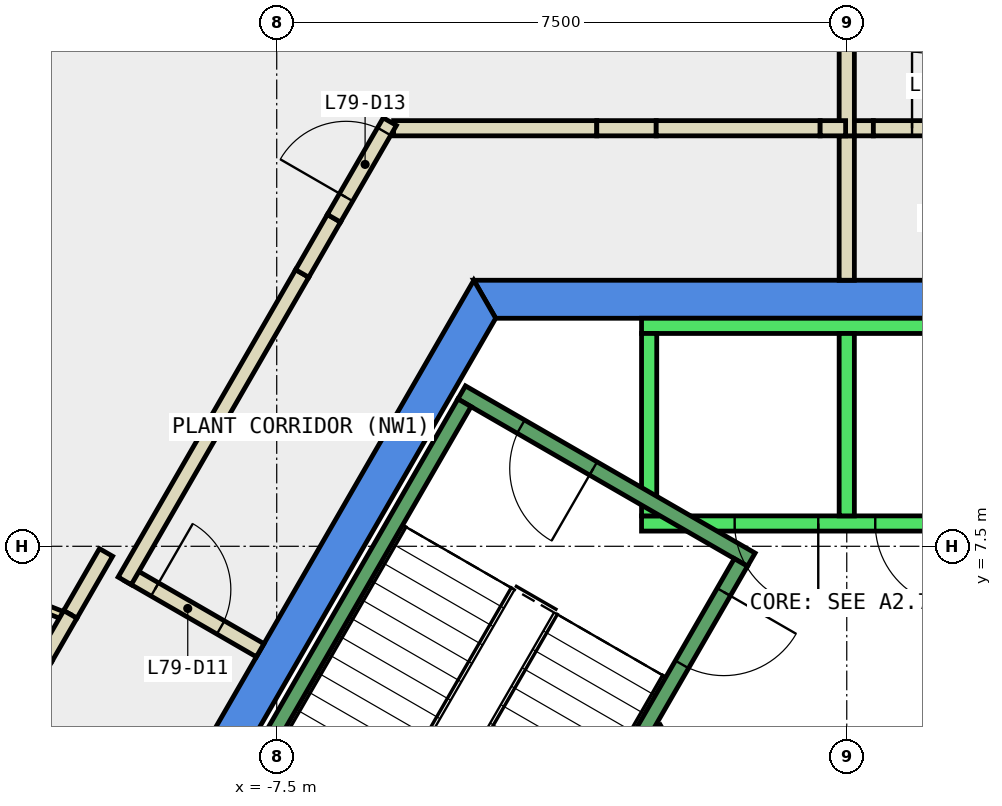
"""IFC4 building model, lengths in metres.
Left out: names, types, materials, properties, quantities, classifications, styles, units other than length and angle.
Written with IfcOpenShell. Run it as: python <this file> out.ifc"""

import sys

from ifc_helpers import new_model, si_unit, direction, frame, frame_2d, origin, place, context, subcontext, project, spatial, polyline, rectangle, outline, extrude, element, fill, save


model = new_model("IFC4")
c1 = context("Model", 3, precision=1e-05, world=origin(), true_north=direction((0.0, 1.0)))
c2 = subcontext(c1, "Body", "Model", "MODEL_VIEW")
j1 = project(units=[si_unit("LENGTHUNIT", "METRE"), si_unit("PLANEANGLEUNIT", "RADIAN")], contexts=[c1])
p1 = place(None, origin())
s1 = spatial("IfcSite", under=j1, at=p1, CompositionType="ELEMENT")
p2 = place(p1, origin())
s2 = spatial("IfcBuilding", under=s1, at=p2, CompositionType="ELEMENT")
p3 = place(p2, frame((0.0, 0.0, 335.9)))
s3 = spatial("IfcBuildingStorey", under=s2, at=p3, CompositionType="ELEMENT", Elevation=335.9)
p4 = place(p3, frame((0.0, 0.0, -0.35)))
e1 = element("IfcWall", 1, at=p4, inside=s3, PredefinedType="SHEAR", context=c2, shape_type="SweptSolid", body=[
    extrude(outline(polyline([(4.907, 11.0), (-4.907, 11.0), (-4.619, 10.5), (4.619, 10.5), (4.907, 11.0)])), origin(), (0.0, 0.0, 1.0), 4.4),
])
p5 = place(p3, frame((0.0, 0.0, -0.35)))
e2 = element("IfcWall", 2, at=p5, inside=s3, PredefinedType="SHEAR", context=c2, shape_type="SweptSolid", body=[
    extrude(outline(polyline([(-9.236, 3.502), (-8.803, 3.253), (-4.619, 10.5), (-4.907, 11.0), (-9.236, 3.502)])), origin(), (0.0, 0.0, 1.0), 4.4),
])
p6 = place(p3, frame((-10.287, 14.711, 0.0), z_axis=(0.0, 0.0, 1.0), x_axis=(-0.509697735304, -0.86035354281, 0.0)))
e3 = element("IfcWall", 3, at=p6, inside=s3, PredefinedType="STANDARD", context=c2, shape_type="SweptSolid", body=[
    extrude(rectangle(XDim=7.098, YDim=0.3, at=frame_2d((3.549, 0.0))), origin(), (0.0, 0.0, 1.0), 4.05),
])
p7 = place(p6, frame((0.575, 0.0, 0.9)))
e4 = element("IfcOpeningElement", 4, at=p7, cuts=e3, PredefinedType="OPENING", context=c2, shape_type="SweptSolid", body=[
    extrude(rectangle(XDim=2.4, YDim=3.0, at=frame_2d((1.2, 1.5))), frame((0.0, 0.16, 0.0), z_axis=(0.0, -1.0, 0.0), x_axis=(1.0, 0.0, 0.0)), (0.0, 0.0, 1.0), 0.32),
])
p8 = place(p6, frame((4.124, 0.0, 0.9)))
e5 = element("IfcOpeningElement", 5, at=p8, cuts=e3, PredefinedType="OPENING", context=c2, shape_type="SweptSolid", body=[
    extrude(rectangle(XDim=2.4, YDim=3.0, at=frame_2d((1.2, 1.5))), frame((0.0, 0.16, 0.0), z_axis=(0.0, -1.0, 0.0), x_axis=(1.0, 0.0, 0.0)), (0.0, 0.0, 1.0), 0.32),
])
p9 = place(p3, frame((-2.54, 5.1, 0.0), z_axis=(0.0, 0.0, 1.0), x_axis=(0.499925051871, -0.866068670783, 0.0)))
e6 = element("IfcWall", 6, at=p9, inside=s3, PredefinedType="PARTITIONING", context=c2, shape_type="SweptSolid", body=[
    extrude(rectangle(XDim=5.181, YDim=0.2, at=frame_2d((2.59, 0.0))), origin(), (0.0, 0.0, 1.0), 4.05),
])
p10 = place(p9, frame((2.04, 0.0, 0.0)))
e7 = element("IfcOpeningElement", 7, at=p10, cuts=e6, PredefinedType="OPENING", context=c2, shape_type="SweptSolid", body=[
    extrude(rectangle(XDim=1.0, YDim=2.1, at=frame_2d((0.5, 1.05))), frame((0.0, 0.11, 0.0), z_axis=(0.0, -1.0, 0.0), x_axis=(1.0, 0.0, 0.0)), (0.0, 0.0, 1.0), 0.22),
])
p11 = place(p3, frame((0.015, 13.0, 0.0), z_axis=(0.0, 0.0, 1.0), x_axis=(1.0, 0.0, 0.0)))
e8 = element("IfcWall", 8, at=p11, inside=s3, PredefinedType="PARTITIONING", context=c2, shape_type="SweptSolid", body=[
    extrude(rectangle(XDim=0.335, YDim=0.2, at=frame_2d((0.167, 0.0))), origin(), (0.0, 0.0, 1.0), 1.95),
])
p12 = place(p3, frame((0.0, 11.0, 0.0), z_axis=(0.0, 0.0, 1.0), x_axis=(0.0, 1.0, 0.0)))
e9 = element("IfcWall", 9, at=p12, inside=s3, PredefinedType="PARTITIONING", context=c2, shape_type="SweptSolid", body=[
    extrude(rectangle(XDim=1.9, YDim=0.2, at=frame_2d((0.95, 0.0))), origin(), (0.0, 0.0, 1.0), 1.95),
])
p13 = place(p3, frame((0.0, 12.9, 0.0), z_axis=(0.0, 0.0, 1.0), x_axis=(0.0, 1.0, 0.0)))
e10 = element("IfcWall", 10, at=p13, inside=s3, PredefinedType="PARTITIONING", context=c2, shape_type="SweptSolid", body=[
    extrude(rectangle(XDim=10.092, YDim=0.2, at=frame_2d((5.046, 0.0))), origin(), (0.0, 0.0, 1.0), 1.95),
])
p14 = place(p3, frame((-9.45, 7.132, 0.0), z_axis=(0.0, 0.0, 1.0), x_axis=(0.866010750942, -0.50002537861, 0.0)))
e11 = element("IfcWall", 11, at=p14, inside=s3, PredefinedType="PARTITIONING", context=c2, shape_type="SweptSolid", body=[
    extrude(rectangle(XDim=2.0, YDim=0.2, at=frame_2d((1.0, 0.0))), origin(), (0.0, 0.0, 1.0), 4.05),
])
p15 = place(p14, frame((0.4, 0.0, 0.0)))
e12 = element("IfcOpeningElement", 12, at=p15, cuts=e11, PredefinedType="OPENING", context=c2, shape_type="SweptSolid", body=[
    extrude(rectangle(XDim=1.0, YDim=2.1, at=frame_2d((0.5, 1.05))), frame((0.0, 0.11, 0.0), z_axis=(0.0, -1.0, 0.0), x_axis=(1.0, 0.0, 0.0)), (0.0, 0.0, 1.0), 0.22),
])
p16 = place(p3, frame((-10.216, 6.604, 0.0), z_axis=(0.0, 0.0, 1.0), x_axis=(0.499572668549, 0.866271983178, 0.0)))
e13 = element("IfcWall", 13, at=p16, inside=s3, PredefinedType="PARTITIONING", context=c2, shape_type="SweptSolid", body=[
    extrude(rectangle(XDim=0.941, YDim=0.2, at=frame_2d((0.47, 0.0))), origin(), (0.0, 0.0, 1.0), 1.95),
])
p17 = place(p3, frame((-9.5, 7.045, 0.0), z_axis=(0.0, 0.0, 1.0), x_axis=(0.500007559336, 0.866021039356, 0.0)))
e14 = element("IfcWall", 14, at=p17, inside=s3, PredefinedType="PARTITIONING", context=c2, shape_type="SweptSolid", body=[
    extrude(rectangle(XDim=4.67, YDim=0.2, at=frame_2d((2.335, 0.0))), origin(), (0.0, 0.0, 1.0), 4.05),
])
p18 = place(p3, frame((-5.962, 13.0, 0.0), z_axis=(0.0, 0.0, 1.0), x_axis=(1.0, 0.0, 0.0)))
e15 = element("IfcWall", 15, at=p18, inside=s3, PredefinedType="PARTITIONING", context=c2, shape_type="SweptSolid", body=[
    extrude(rectangle(XDim=2.673, YDim=0.2, at=frame_2d((1.336, 0.0))), origin(), (0.0, 0.0, 1.0), 4.05),
])
p19 = place(p3, frame((-13.135, 7.709, 0.0), z_axis=(0.0, 0.0, 1.0), x_axis=(0.929543616209, -0.368712171707, 0.0)))
e16 = element("IfcWall", 16, at=p19, inside=s3, PredefinedType="PARTITIONING", context=c2, shape_type="SweptSolid", body=[
    extrude(rectangle(XDim=3.113, YDim=0.1, at=frame_2d((1.557, 0.0))), origin(), (0.0, 0.0, 1.0), 1.95),
])
p20 = place(p3, frame((0.35, 13.0, 0.0), z_axis=(0.0, 0.0, 1.0), x_axis=(1.0, 0.0, 0.0)))
e17 = element("IfcWall", 17, at=p20, inside=s3, PredefinedType="PARTITIONING", context=c2, shape_type="SweptSolid", body=[
    extrude(rectangle(XDim=2.157, YDim=0.2, at=frame_2d((1.079, 0.0))), origin(), (0.0, 0.0, 1.0), 4.05),
])
p21 = place(p20, frame((0.509, 0.0, 0.0)))
e18 = element("IfcOpeningElement", 18, at=p21, cuts=e17, PredefinedType="OPENING", context=c2, shape_type="SweptSolid", body=[
    extrude(rectangle(XDim=1.0, YDim=2.1, at=frame_2d((0.5, 1.05))), frame((0.0, 0.11, 0.0), z_axis=(0.0, -1.0, 0.0), x_axis=(1.0, 0.0, 0.0)), (0.0, 0.0, 1.0), 0.22),
])
p22 = place(p3, frame((-10.543, 6.037, 0.0), z_axis=(0.0, 0.0, 1.0), x_axis=(0.49955019049, 0.86628494572, 0.0)))
e19 = element("IfcWall", 19, at=p22, inside=s3, PredefinedType="PARTITIONING", context=c2, shape_type="SweptSolid", body=[
    extrude(rectangle(XDim=0.654, YDim=0.2, at=frame_2d((0.327, 0.0))), origin(), (0.0, 0.0, 1.0), 1.95),
])
p23 = place(p3, frame((-7.165, 11.089, 0.0), z_axis=(0.0, 0.0, 1.0), x_axis=(0.499024148071, 0.866588079564, 0.0)))
e20 = element("IfcWall", 20, at=p23, inside=s3, PredefinedType="PARTITIONING", context=c2, shape_type="SweptSolid", body=[
    extrude(rectangle(XDim=0.838, YDim=0.2, at=frame_2d((0.419, 0.0))), origin(), (0.0, 0.0, 1.0), 1.95),
])
p24 = place(p3, frame((-6.747, 11.815, 0.0), z_axis=(0.0, 0.0, 1.0), x_axis=(0.500374498448, 0.865809079014, 0.0)))
e21 = element("IfcWall", 21, at=p24, inside=s3, PredefinedType="PARTITIONING", context=c2, shape_type="SweptSolid", body=[
    extrude(rectangle(XDim=1.469, YDim=0.2, at=frame_2d((0.734, 0.0))), origin(), (0.0, 0.0, 1.0), 4.05),
])
p25 = place(p24, frame((0.319, 0.0, 0.0)))
e22 = element("IfcOpeningElement", 22, at=p25, cuts=e21, PredefinedType="OPENING", context=c2, shape_type="SweptSolid", body=[
    extrude(rectangle(XDim=1.0, YDim=2.1, at=frame_2d((0.5, 1.05))), frame((0.0, 0.11, 0.0), z_axis=(0.0, -1.0, 0.0), x_axis=(1.0, 0.0, 0.0)), (0.0, 0.0, 1.0), 0.22),
])
p26 = place(p3, frame((-3.289, 13.0, 0.0), z_axis=(0.0, 0.0, 1.0), x_axis=(1.0, 0.0, 0.0)))
e23 = element("IfcWall", 23, at=p26, inside=s3, PredefinedType="PARTITIONING", context=c2, shape_type="SweptSolid", body=[
    extrude(rectangle(XDim=0.782, YDim=0.2, at=frame_2d((0.391, 0.0))), origin(), (0.0, 0.0, 1.0), 1.95),
])
p27 = place(p3, frame((-2.507, 13.0, 0.0), z_axis=(0.0, 0.0, 1.0), x_axis=(1.0, 0.0, 0.0)))
e24 = element("IfcWall", 24, at=p27, inside=s3, PredefinedType="PARTITIONING", context=c2, shape_type="SweptSolid", body=[
    extrude(rectangle(XDim=2.157, YDim=0.2, at=frame_2d((1.079, 0.0))), origin(), (0.0, 0.0, 1.0), 4.05),
])
p28 = place(p3, frame((-0.35, 13.0, 0.0), z_axis=(0.0, 0.0, 1.0), x_axis=(1.0, 0.0, 0.0)))
e25 = element("IfcWall", 25, at=p28, inside=s3, PredefinedType="PARTITIONING", context=c2, shape_type="SweptSolid", body=[
    extrude(rectangle(XDim=0.335, YDim=0.2, at=frame_2d((0.167, 0.0))), origin(), (0.0, 0.0, 1.0), 1.95),
])
p29 = place(p3, frame((2.7, 7.8, 0.0), z_axis=(0.0, 0.0, 1.0), x_axis=(-1.0, 0.0, 0.0)))
e26 = element("IfcWall", 26, at=p29, inside=s3, PredefinedType="STANDARD", context=c2, shape_type="SweptSolid", body=[
    extrude(rectangle(XDim=5.4, YDim=0.2, at=frame_2d((2.7, 0.0))), origin(), (0.0, 0.0, 1.0), 4.05),
])
p30 = place(p29, frame((1.225, 0.0, 0.0)))
e27 = element("IfcOpeningElement", 27, at=p30, cuts=e26, PredefinedType="OPENING", context=c2, shape_type="SweptSolid", body=[
    extrude(rectangle(XDim=1.1, YDim=2.1, at=frame_2d((0.55, 1.05))), frame((0.0, 0.11, 0.0), z_axis=(0.0, -1.0, 0.0), x_axis=(1.0, 0.0, 0.0)), (0.0, 0.0, 1.0), 0.22),
])
p31 = place(p29, frame((3.075, 0.0, 0.0)))
e28 = element("IfcOpeningElement", 28, at=p31, cuts=e26, PredefinedType="OPENING", context=c2, shape_type="SweptSolid", body=[
    extrude(rectangle(XDim=1.1, YDim=2.1, at=frame_2d((0.55, 1.05))), frame((0.0, 0.11, 0.0), z_axis=(0.0, -1.0, 0.0), x_axis=(1.0, 0.0, 0.0)), (0.0, 0.0, 1.0), 0.22),
])
p32 = place(p3, frame((2.7, 10.4, 0.0), z_axis=(0.0, 0.0, 1.0), x_axis=(-1.0, 0.0, 0.0)))
e29 = element("IfcWall", 29, at=p32, inside=s3, PredefinedType="STANDARD", context=c2, shape_type="SweptSolid", body=[
    extrude(rectangle(XDim=5.4, YDim=0.2, at=frame_2d((2.7, 0.0))), origin(), (0.0, 0.0, 1.0), 4.05),
])
for number, where, z_axis, x_axis in (
    (30, (0.0, 7.9, 0.0), (0.0, 0.0, 1.0), (0.0, 1.0, 0.0)),
    (31, (-2.6, 7.9, 0.0), (0.0, 0.0, 1.0), (0.0, 1.0, 0.0)),
):
    element("IfcWall", number, at=place(p3, frame(where, z_axis=z_axis, x_axis=x_axis)), inside=s3, PredefinedType="STANDARD", context=c2, shape_type="SweptSolid", body=[
        extrude(rectangle(XDim=2.4, YDim=0.2, at=frame_2d((1.2, 0.0))), origin(), (0.0, 0.0, 1.0), 4.05),
    ])
p33 = place(p3, frame((-1.256, 7.324, 0.0), z_axis=(0.0, 0.0, 1.0), x_axis=(-0.866046073146, 0.499964197906, 0.0)))
e32 = element("IfcWall", 32, at=p33, inside=s3, PredefinedType="STANDARD", context=c2, shape_type="SweptSolid", body=[
    extrude(rectangle(XDim=4.4, YDim=0.2, at=frame_2d((2.2, 0.0))), origin(), (0.0, 0.0, 1.0), 4.05),
])
p34 = place(p33, frame((2.4, 0.0, 0.0)))
e33 = element("IfcOpeningElement", 33, at=p34, cuts=e32, PredefinedType="OPENING", context=c2, shape_type="SweptSolid", body=[
    extrude(rectangle(XDim=1.1, YDim=2.2, at=frame_2d((0.55, 1.1))), frame((0.0, 0.11, 0.0), z_axis=(0.0, -1.0, 0.0), x_axis=(1.0, 0.0, 0.0)), (0.0, 0.0, 1.0), 0.22),
])
p35 = place(p3, frame((-1.393, 7.288, 0.0), z_axis=(0.0, 0.0, 1.0), x_axis=(-0.499963383562, -0.866046543262, 0.0)))
e34 = element("IfcWall", 34, at=p35, inside=s3, PredefinedType="STANDARD", context=c2, shape_type="SweptSolid", body=[
    extrude(rectangle(XDim=6.9, YDim=0.2, at=frame_2d((3.45, 0.0))), origin(), (0.0, 0.0, 1.0), 4.05),
])
p36 = place(p35, frame((0.45, 0.0, 0.0)))
e35 = element("IfcOpeningElement", 35, at=p36, cuts=e34, PredefinedType="OPENING", context=c2, shape_type="SweptSolid", body=[
    extrude(rectangle(XDim=1.1, YDim=2.2, at=frame_2d((0.55, 1.1))), frame((0.0, 0.11, 0.0), z_axis=(0.0, -1.0, 0.0), x_axis=(1.0, 0.0, 0.0)), (0.0, 0.0, 1.0), 0.22),
])
p37 = place(p3, frame((-5.03, 9.388, 0.0), z_axis=(0.0, 0.0, 1.0), x_axis=(-0.499978703459, -0.866037698999, 0.0)))
e36 = element("IfcWall", 36, at=p37, inside=s3, PredefinedType="STANDARD", context=c2, shape_type="SweptSolid", body=[
    extrude(rectangle(XDim=6.9, YDim=0.2, at=frame_2d((3.45, 0.0))), origin(), (0.0, 0.0, 1.0), 4.05),
])
p38 = place(p21, origin())
e37 = element("IfcDoor", 37, at=p38, inside=s3, OperationType="SINGLE_SWING_LEFT", PredefinedType="DOOR", context=c2, shape_type="SweptSolid", body=[
    extrude(rectangle(XDim=1.0, YDim=2.1, at=frame_2d((0.5, 1.05))), frame((0.0, 0.025, 0.0), z_axis=(0.0, -1.0, 0.0), x_axis=(1.0, 0.0, 0.0)), (0.0, 0.0, 1.0), 0.05),
])
fill(e18, e37)
p39 = place(p15, origin())
e38 = element("IfcDoor", 38, at=p39, inside=s3, OperationType="SINGLE_SWING_LEFT", PredefinedType="DOOR", context=c2, shape_type="SweptSolid", body=[
    extrude(rectangle(XDim=1.0, YDim=2.1, at=frame_2d((0.5, 1.05))), frame((0.0, 0.025, 0.0), z_axis=(0.0, -1.0, 0.0), x_axis=(1.0, 0.0, 0.0)), (0.0, 0.0, 1.0), 0.05),
])
fill(e12, e38)
p40 = place(p25, origin())
e39 = element("IfcDoor", 39, at=p40, inside=s3, OperationType="SINGLE_SWING_RIGHT", PredefinedType="DOOR", context=c2, shape_type="SweptSolid", body=[
    extrude(rectangle(XDim=1.0, YDim=2.1, at=frame_2d((0.5, 1.05))), frame((0.0, 0.025, 0.0), z_axis=(0.0, -1.0, 0.0), x_axis=(1.0, 0.0, 0.0)), (0.0, 0.0, 1.0), 0.05),
])
fill(e22, e39)
p41 = place(p30, origin())
e40 = element("IfcDoor", 40, at=p41, inside=s3, OperationType="SLIDING_TO_LEFT", PredefinedType="DOOR", context=c2, shape_type="SweptSolid", body=[
    extrude(rectangle(XDim=1.1, YDim=2.1, at=frame_2d((0.55, 1.05))), frame((0.0, 0.025, 0.0), z_axis=(0.0, -1.0, 0.0), x_axis=(1.0, 0.0, 0.0)), (0.0, 0.0, 1.0), 0.05),
])
fill(e27, e40)
p42 = place(p31, origin())
e41 = element("IfcDoor", 41, at=p42, inside=s3, OperationType="SLIDING_TO_LEFT", PredefinedType="DOOR", context=c2, shape_type="SweptSolid", body=[
    extrude(rectangle(XDim=1.1, YDim=2.1, at=frame_2d((0.55, 1.05))), frame((0.0, 0.025, 0.0), z_axis=(0.0, -1.0, 0.0), x_axis=(1.0, 0.0, 0.0)), (0.0, 0.0, 1.0), 0.05),
])
fill(e28, e41)
p43 = place(p36, origin())
e42 = element("IfcDoor", 42, at=p43, inside=s3, OperationType="SINGLE_SWING_LEFT", PredefinedType="DOOR", context=c2, shape_type="SweptSolid", body=[
    extrude(rectangle(XDim=1.1, YDim=2.2, at=frame_2d((0.55, 1.1))), frame((0.0, 0.025, 0.0), z_axis=(0.0, -1.0, 0.0), x_axis=(1.0, 0.0, 0.0)), (0.0, 0.0, 1.0), 0.05),
])
fill(e35, e42)
p44 = place(p34, origin())
e43 = element("IfcDoor", 43, at=p44, inside=s3, OperationType="SINGLE_SWING_LEFT", PredefinedType="DOOR", context=c2, shape_type="SweptSolid", body=[
    extrude(rectangle(XDim=1.1, YDim=2.2, at=frame_2d((0.55, 1.1))), frame((0.0, 0.025, 0.0), z_axis=(0.0, -1.0, 0.0), x_axis=(1.0, 0.0, 0.0)), (0.0, 0.0, 1.0), 0.05),
])
fill(e33, e43)
save(model, sys.argv[1])
